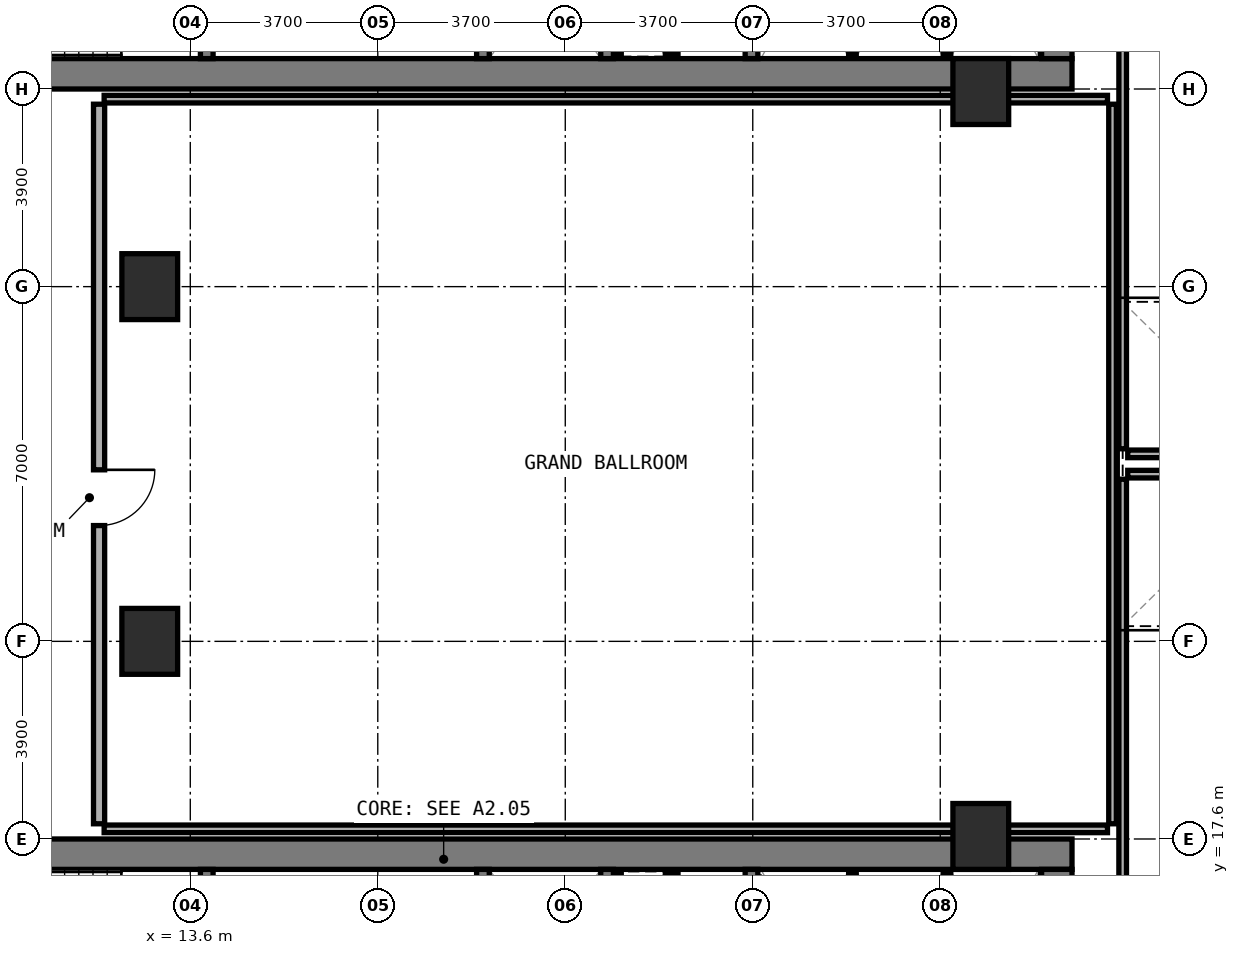
"""IFC4 building model, lengths in metres.
Left out: names, types, materials, properties, quantities, classifications, styles, units other than length and angle.
Written with IfcOpenShell. Run it as: python <this file> out.ifc"""

import sys

from ifc_helpers import new_model, si_unit, direction, frame, frame_2d, origin, origin_2d, place, context, subcontext, project, spatial, rectangle, extrude, element, fill, save


model = new_model("IFC4")
c1 = context("Model", 3, precision=1e-05, world=origin(), true_north=direction((0.0, 1.0)))
c2 = subcontext(c1, "Body", "Model", "MODEL_VIEW")
j1 = project(units=[si_unit("LENGTHUNIT", "METRE"), si_unit("PLANEANGLEUNIT", "RADIAN")], contexts=[c1])
p1 = place(None, origin())
s1 = spatial("IfcSite", under=j1, at=p1, CompositionType="ELEMENT")
p2 = place(p1, origin())
s2 = spatial("IfcBuilding", under=s1, at=p2, CompositionType="ELEMENT")
p3 = place(p2, frame((0.0, 0.0, 10.2)))
s3 = spatial("IfcBuildingStorey", under=s2, at=p3, CompositionType="ELEMENT", Elevation=10.2)
p4 = place(p3, frame((6.2, 32.7, 0.0), z_axis=(0.0, 0.0, 1.0), x_axis=(1.0, 0.0, 0.0)))
e1 = element("IfcWall", 1, at=p4, inside=s3, PredefinedType="SHEAR", context=c2, shape_type="SweptSolid", body=[
    extrude(rectangle(XDim=24.8, YDim=0.6, at=frame_2d((12.4, 0.0))), origin(), (0.0, 0.0, 1.0), 4.8),
])
p5 = place(p3, frame((30.7, 33.0, 0.0), z_axis=(0.0, 0.0, 1.0), x_axis=(0.0, 1.0, 0.0)))
e2 = element("IfcWall", 2, at=p5, inside=s3, PredefinedType="SHEAR", context=c2, shape_type="SweptSolid", body=[
    extrude(rectangle(XDim=3.16, YDim=0.6, at=frame_2d((1.58, 0.0))), origin(), (0.0, 0.0, 1.0), 4.8),
])
p6 = place(p3, frame((13.925, 33.0, 0.0), z_axis=(0.0, 0.0, 1.0), x_axis=(0.0, 1.0, 0.0)))
e3 = element("IfcWall", 3, at=p6, inside=s3, PredefinedType="STANDARD", context=c2, shape_type="SweptSolid", body=[
    extrude(rectangle(XDim=3.16, YDim=0.25, at=frame_2d((1.58, 0.0))), origin(), (0.0, 0.0, 1.0), 4.45),
])
p7 = place(p6, frame((0.98, 0.0, 0.0)))
e4 = element("IfcOpeningElement", 4, at=p7, cuts=e3, PredefinedType="OPENING", context=c2, shape_type="SweptSolid", body=[
    extrude(rectangle(XDim=1.1, YDim=2.15, at=frame_2d((0.55, 1.075))), frame((0.0, 0.135, 0.0), z_axis=(0.0, -1.0, 0.0), x_axis=(1.0, 0.0, 0.0)), (0.0, 0.0, 1.0), 0.27),
])
p8 = place(p3, frame((19.375, 33.0, 0.0), z_axis=(0.0, 0.0, 1.0), x_axis=(0.0, 1.0, 0.0)))
e5 = element("IfcWall", 5, at=p8, inside=s3, PredefinedType="STANDARD", context=c2, shape_type="SweptSolid", body=[
    extrude(rectangle(XDim=3.16, YDim=0.25, at=frame_2d((1.58, 0.0))), origin(), (0.0, 0.0, 1.0), 4.45),
])
p9 = place(p8, frame((0.98, 0.0, 0.0)))
e6 = element("IfcOpeningElement", 6, at=p9, cuts=e5, PredefinedType="OPENING", context=c2, shape_type="SweptSolid", body=[
    extrude(rectangle(XDim=1.1, YDim=2.15, at=frame_2d((0.55, 1.075))), frame((0.0, 0.135, 0.0), z_axis=(0.0, -1.0, 0.0), x_axis=(1.0, 0.0, 0.0)), (0.0, 0.0, 1.0), 0.27),
])
for number, where, z_axis, x_axis in (
    (7, (21.825, 33.0, 0.0), (0.0, 0.0, 1.0), (0.0, 1.0, 0.0)),
    (8, (24.675, 33.0, 0.0), (0.0, 0.0, 1.0), (0.0, 1.0, 0.0)),
):
    element("IfcWall", number, at=place(p3, frame(where, z_axis=z_axis, x_axis=x_axis)), inside=s3, PredefinedType="STANDARD", context=c2, shape_type="SweptSolid", body=[
        extrude(rectangle(XDim=3.16, YDim=0.25, at=frame_2d((1.58, 0.0))), origin(), (0.0, 0.0, 1.0), 4.45),
    ])
p10 = place(p3, frame((6.2, 17.3, 0.0), z_axis=(0.0, 0.0, 1.0), x_axis=(1.0, 0.0, 0.0)))
e9 = element("IfcWall", 9, at=p10, inside=s3, PredefinedType="SHEAR", context=c2, shape_type="SweptSolid", body=[
    extrude(rectangle(XDim=24.8, YDim=0.6, at=frame_2d((12.4, 0.0))), origin(), (0.0, 0.0, 1.0), 4.8),
])
p11 = place(p3, frame((30.7, 13.84, 0.0), z_axis=(0.0, 0.0, 1.0), x_axis=(0.0, 1.0, 0.0)))
e10 = element("IfcWall", 10, at=p11, inside=s3, PredefinedType="SHEAR", context=c2, shape_type="SweptSolid", body=[
    extrude(rectangle(XDim=3.16, YDim=0.6, at=frame_2d((1.58, 0.0))), origin(), (0.0, 0.0, 1.0), 4.8),
])
p12 = place(p3, frame((13.925, 13.84, 0.0), z_axis=(0.0, 0.0, 1.0), x_axis=(0.0, 1.0, 0.0)))
e11 = element("IfcWall", 11, at=p12, inside=s3, PredefinedType="STANDARD", context=c2, shape_type="SweptSolid", body=[
    extrude(rectangle(XDim=3.16, YDim=0.25, at=frame_2d((1.58, 0.0))), origin(), (0.0, 0.0, 1.0), 4.45),
])
p13 = place(p12, frame((0.98, 0.0, 0.0)))
e12 = element("IfcOpeningElement", 12, at=p13, cuts=e11, PredefinedType="OPENING", context=c2, shape_type="SweptSolid", body=[
    extrude(rectangle(XDim=1.1, YDim=2.15, at=frame_2d((0.55, 1.075))), frame((0.0, 0.135, 0.0), z_axis=(0.0, -1.0, 0.0), x_axis=(1.0, 0.0, 0.0)), (0.0, 0.0, 1.0), 0.27),
])
p14 = place(p3, frame((19.375, 13.84, 0.0), z_axis=(0.0, 0.0, 1.0), x_axis=(0.0, 1.0, 0.0)))
e13 = element("IfcWall", 13, at=p14, inside=s3, PredefinedType="STANDARD", context=c2, shape_type="SweptSolid", body=[
    extrude(rectangle(XDim=3.16, YDim=0.25, at=frame_2d((1.58, 0.0))), origin(), (0.0, 0.0, 1.0), 4.45),
])
p15 = place(p14, frame((0.98, 0.0, 0.0)))
e14 = element("IfcOpeningElement", 14, at=p15, cuts=e13, PredefinedType="OPENING", context=c2, shape_type="SweptSolid", body=[
    extrude(rectangle(XDim=1.1, YDim=2.15, at=frame_2d((0.55, 1.075))), frame((0.0, 0.135, 0.0), z_axis=(0.0, -1.0, 0.0), x_axis=(1.0, 0.0, 0.0)), (0.0, 0.0, 1.0), 0.27),
])
for number, where, z_axis, x_axis in (
    (15, (21.825, 13.84, 0.0), (0.0, 0.0, 1.0), (0.0, 1.0, 0.0)),
    (16, (24.675, 13.84, 0.0), (0.0, 0.0, 1.0), (0.0, 1.0, 0.0)),
):
    element("IfcWall", number, at=place(p3, frame(where, z_axis=z_axis, x_axis=x_axis)), inside=s3, PredefinedType="STANDARD", context=c2, shape_type="SweptSolid", body=[
        extrude(rectangle(XDim=3.16, YDim=0.25, at=frame_2d((1.58, 0.0))), origin(), (0.0, 0.0, 1.0), 4.45),
    ])
for number, where, z_axis, x_axis in (
    (17, (12.8, 21.5, 0.0), (0.0, 0.0, 1.0), (1.0, 0.0, 0.0)),
    (18, (12.8, 28.5, 0.0), (0.0, 0.0, 1.0), (1.0, 0.0, 0.0)),
    (19, (29.2, 17.65, 0.0), (0.0, 0.0, 1.0), (1.0, 0.0, 0.0)),
    (20, (29.2, 32.35, 0.0), (0.0, 0.0, 1.0), (1.0, 0.0, 0.0)),
):
    element("IfcColumn", number, at=place(p3, frame(where, z_axis=z_axis, x_axis=x_axis)), inside=s3, PredefinedType="COLUMN", context=c2, shape_type="SweptSolid", body=[
        extrude(rectangle(XDim=1.1, YDim=1.3, at=origin_2d()), origin(), (0.0, 0.0, 1.0), 4.8),
    ])
p16 = place(p3, frame((22.03, 33.1, 0.0), z_axis=(0.0, 0.0, 1.0), x_axis=(0.0, 1.0, 0.0)))
e21 = element("IfcWall", 21, at=p16, inside=s3, PredefinedType="PARTITIONING", context=c2, shape_type="SweptSolid", body=[
    extrude(rectangle(XDim=1.62, YDim=0.15, at=frame_2d((0.81, 0.0))), origin(), (0.0, 0.0, 1.0), 4.45),
])
p17 = place(p3, frame((23.1, 33.1, 0.0), z_axis=(0.0, 0.0, 1.0), x_axis=(0.0, 1.0, 0.0)))
e22 = element("IfcWall", 22, at=p17, inside=s3, PredefinedType="SOLIDWALL", context=c2, shape_type="SweptSolid", body=[
    extrude(rectangle(XDim=1.62, YDim=0.25, at=frame_2d((0.81, 0.0))), origin(), (0.0, 0.0, 1.0), 4.45),
])
p18 = place(p3, frame((26.667, 33.1, 0.0), z_axis=(0.0, 0.0, 1.0), x_axis=(0.0, 1.0, 0.0)))
e23 = element("IfcWall", 23, at=p18, inside=s3, PredefinedType="PARTITIONING", context=c2, shape_type="SweptSolid", body=[
    extrude(rectangle(XDim=2.96, YDim=0.15, at=frame_2d((1.48, 0.0))), origin(), (0.0, 0.0, 1.0), 4.45),
])
p19 = place(p3, frame((28.533, 33.1, 0.0), z_axis=(0.0, 0.0, 1.0), x_axis=(0.0, 1.0, 0.0)))
e24 = element("IfcWall", 24, at=p19, inside=s3, PredefinedType="PARTITIONING", context=c2, shape_type="SweptSolid", body=[
    extrude(rectangle(XDim=2.96, YDim=0.15, at=frame_2d((1.48, 0.0))), origin(), (0.0, 0.0, 1.0), 3.525),
])
p20 = place(p3, frame((22.03, 15.28, 0.0), z_axis=(0.0, 0.0, 1.0), x_axis=(0.0, 1.0, 0.0)))
e25 = element("IfcWall", 25, at=p20, inside=s3, PredefinedType="PARTITIONING", context=c2, shape_type="SweptSolid", body=[
    extrude(rectangle(XDim=1.62, YDim=0.15, at=frame_2d((0.81, 0.0))), origin(), (0.0, 0.0, 1.0), 4.45),
])
p21 = place(p3, frame((23.1, 15.28, 0.0), z_axis=(0.0, 0.0, 1.0), x_axis=(0.0, 1.0, 0.0)))
e26 = element("IfcWall", 26, at=p21, inside=s3, PredefinedType="SOLIDWALL", context=c2, shape_type="SweptSolid", body=[
    extrude(rectangle(XDim=1.62, YDim=0.25, at=frame_2d((0.81, 0.0))), origin(), (0.0, 0.0, 1.0), 4.45),
])
p22 = place(p3, frame((26.667, 13.94, 0.0), z_axis=(0.0, 0.0, 1.0), x_axis=(0.0, 1.0, 0.0)))
e27 = element("IfcWall", 27, at=p22, inside=s3, PredefinedType="PARTITIONING", context=c2, shape_type="SweptSolid", body=[
    extrude(rectangle(XDim=2.96, YDim=0.15, at=frame_2d((1.48, 0.0))), origin(), (0.0, 0.0, 1.0), 4.45),
])
p23 = place(p3, frame((28.533, 13.94, 0.0), z_axis=(0.0, 0.0, 1.0), x_axis=(0.0, 1.0, 0.0)))
e28 = element("IfcWall", 28, at=p23, inside=s3, PredefinedType="PARTITIONING", context=c2, shape_type="SweptSolid", body=[
    extrude(rectangle(XDim=2.96, YDim=0.15, at=frame_2d((1.48, 0.0))), origin(), (0.0, 0.0, 1.0), 3.525),
])
p24 = place(p3, frame((31.8, 17.9, 0.0), z_axis=(0.0, 0.0, 1.0), x_axis=(0.0, 1.0, 0.0)))
e29 = element("IfcWall", 29, at=p24, inside=s3, PredefinedType="PARTITIONING", context=c2, shape_type="SweptSolid", body=[
    extrude(rectangle(XDim=14.2, YDim=0.15, at=frame_2d((7.1, 0.0))), origin(), (0.0, 0.0, 1.0), 3.425),
])
for number, where, z_axis, x_axis in (
    (30, (11.9, 17.8, 0.0), (0.0, 0.0, 1.0), (1.0, 0.0, 0.0)),
    (31, (11.9, 32.2, 0.0), (0.0, 0.0, 1.0), (1.0, 0.0, 0.0)),
):
    element("IfcWall", number, at=place(p3, frame(where, z_axis=z_axis, x_axis=x_axis)), inside=s3, PredefinedType="PARTITIONING", context=c2, shape_type="SweptSolid", body=[
        extrude(rectangle(XDim=19.8, YDim=0.15, at=frame_2d((9.9, 0.0))), origin(), (0.0, 0.0, 1.0), 3.525),
    ])
p25 = place(p3, frame((11.8, 17.9, 0.0), z_axis=(0.0, 0.0, 1.0), x_axis=(0.0, 1.0, 0.0)))
e32 = element("IfcWall", 32, at=p25, inside=s3, PredefinedType="SOLIDWALL", context=c2, shape_type="SweptSolid", body=[
    extrude(rectangle(XDim=14.2, YDim=0.22, at=frame_2d((7.1, 0.0))), origin(), (0.0, 0.0, 1.0), 3.525),
])
p26 = place(p25, frame((5.885, 0.0, 0.0)))
e33 = element("IfcOpeningElement", 33, at=p26, cuts=e32, PredefinedType="OPENING", context=c2, shape_type="SweptSolid", body=[
    extrude(rectangle(XDim=1.1, YDim=2.1, at=frame_2d((0.55, 1.05))), frame((0.0, 0.12, 0.0), z_axis=(0.0, -1.0, 0.0), x_axis=(1.0, 0.0, 0.0)), (0.0, 0.0, 1.0), 0.24),
])
p27 = place(p3, frame((32.0, 13.4, 0.0), z_axis=(0.0, 0.0, 1.0), x_axis=(0.0, 1.0, 0.0)))
e34 = element("IfcWall", 34, at=p27, inside=s3, PredefinedType="PARTITIONING", context=c2, shape_type="SweptSolid", body=[
    extrude(rectangle(XDim=11.3, YDim=0.15, at=frame_2d((5.65, 0.0))), origin(), (0.0, 0.0, 1.0), 3.425),
])
p28 = place(p3, frame((32.1, 24.8, 0.0), z_axis=(0.0, 0.0, 1.0), x_axis=(1.0, 0.0, 0.0)))
e35 = element("IfcWall", 35, at=p28, inside=s3, PredefinedType="PARTITIONING", context=c2, shape_type="SweptSolid", body=[
    extrude(rectangle(XDim=4.65, YDim=0.15, at=frame_2d((2.325, 0.0))), origin(), (0.0, 0.0, 1.0), 3.975),
])
p29 = place(p3, frame((32.0, 25.3, 0.0), z_axis=(0.0, 0.0, 1.0), x_axis=(0.0, 1.0, 0.0)))
e36 = element("IfcWall", 36, at=p29, inside=s3, PredefinedType="PARTITIONING", context=c2, shape_type="SweptSolid", body=[
    extrude(rectangle(XDim=11.3, YDim=0.15, at=frame_2d((5.65, 0.0))), origin(), (0.0, 0.0, 1.0), 3.525),
])
p30 = place(p3, frame((32.1, 25.2, 0.0), z_axis=(0.0, 0.0, 1.0), x_axis=(1.0, 0.0, 0.0)))
e37 = element("IfcWall", 37, at=p30, inside=s3, PredefinedType="PARTITIONING", context=c2, shape_type="SweptSolid", body=[
    extrude(rectangle(XDim=4.65, YDim=0.15, at=frame_2d((2.325, 0.0))), origin(), (0.0, 0.0, 1.0), 3.975),
])
p31 = place(p26, frame((1.1, 0.0, 0.0), z_axis=(0.0, 0.0, 1.0), x_axis=(-1.0, 0.0, 0.0)))
e38 = element("IfcDoor", 38, at=p31, inside=s3, OperationType="SINGLE_SWING_LEFT", PredefinedType="DOOR", context=c2, shape_type="SweptSolid", body=[
    extrude(rectangle(XDim=1.1, YDim=2.1, at=frame_2d((0.55, 1.05))), frame((0.0, 0.025, 0.0), z_axis=(0.0, -1.0, 0.0), x_axis=(1.0, 0.0, 0.0)), (0.0, 0.0, 1.0), 0.05),
])
fill(e33, e38)
save(model, sys.argv[1])
